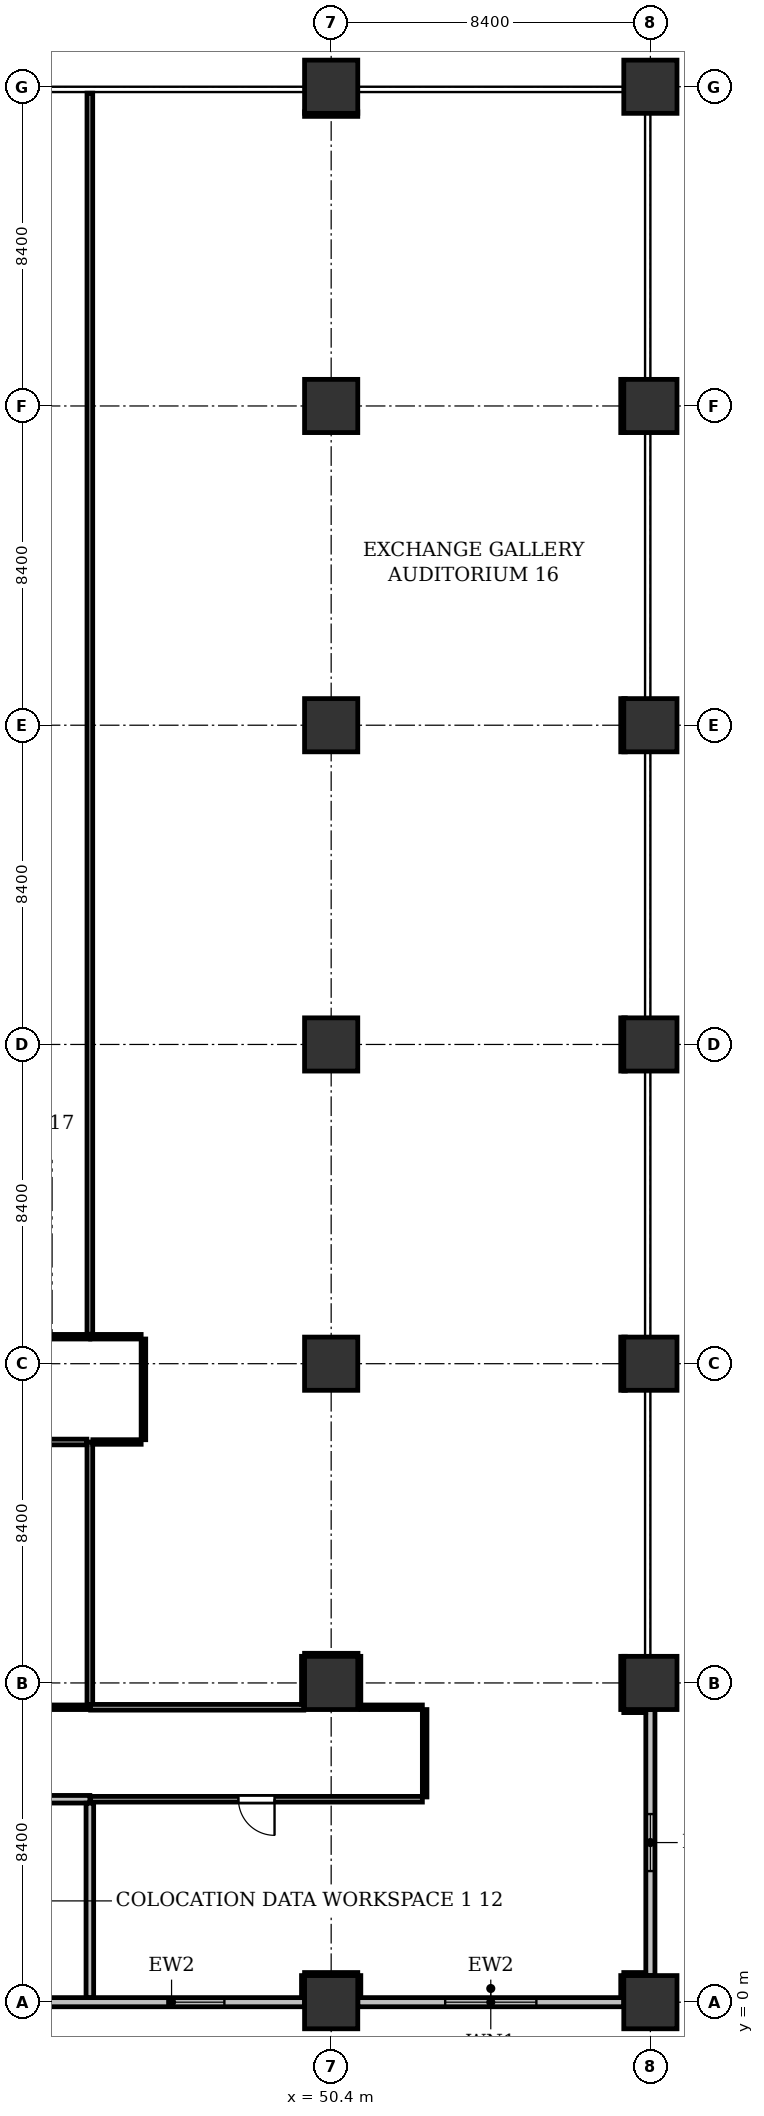
"""IFC4 building model, lengths in metres.
Left out: names, types, materials, properties, quantities, classifications, styles, units other than length and angle.
Written with IfcOpenShell. Run it as: python <this file> out.ifc"""

import sys

from ifc_helpers import new_model, si_unit, direction, frame, frame_2d, origin, origin_2d, place, context, subcontext, project, spatial, rectangle, extrude, element, fill, save


model = new_model("IFC4")
c1 = context("Model", 3, precision=1e-05, world=origin(), true_north=direction((0.0, 1.0)))
c2 = subcontext(c1, "Body", "Model", "MODEL_VIEW")
j1 = project(units=[si_unit("LENGTHUNIT", "METRE"), si_unit("PLANEANGLEUNIT", "RADIAN")], contexts=[c1])
p1 = place(None, origin())
s1 = spatial("IfcSite", under=j1, at=p1, CompositionType="ELEMENT")
p2 = place(p1, origin())
s2 = spatial("IfcBuilding", under=s1, at=p2, CompositionType="ELEMENT")
p3 = place(p2, frame((0.0, 0.0, 10.2)))
s3 = spatial("IfcBuildingStorey", under=s2, at=p3, CompositionType="ELEMENT", Elevation=10.2)
for number, where, z_axis, x_axis in (
    (1, (50.4, 0.0, 0.0), (0.0, 0.0, 1.0), (1.0, 0.0, 0.0)),
    (2, (50.4, 8.4, 0.0), (0.0, 0.0, 1.0), (1.0, 0.0, 0.0)),
    (3, (50.4, 16.8, 0.0), (0.0, 0.0, 1.0), (1.0, 0.0, 0.0)),
    (4, (50.4, 25.2, 0.0), (0.0, 0.0, 1.0), (1.0, 0.0, 0.0)),
    (5, (50.4, 33.6, 0.0), (0.0, 0.0, 1.0), (1.0, 0.0, 0.0)),
    (6, (50.4, 42.0, 0.0), (0.0, 0.0, 1.0), (1.0, 0.0, 0.0)),
    (7, (50.4, 50.4, 0.0), (0.0, 0.0, 1.0), (1.0, 0.0, 0.0)),
    (8, (58.8, 0.0, 0.0), (0.0, 0.0, 1.0), (1.0, 0.0, 0.0)),
    (9, (58.8, 8.4, 0.0), (0.0, 0.0, 1.0), (1.0, 0.0, 0.0)),
    (10, (58.8, 16.8, 0.0), (0.0, 0.0, 1.0), (1.0, 0.0, 0.0)),
    (11, (58.8, 25.2, 0.0), (0.0, 0.0, 1.0), (1.0, 0.0, 0.0)),
    (12, (58.8, 33.6, 0.0), (0.0, 0.0, 1.0), (1.0, 0.0, 0.0)),
    (13, (58.8, 42.0, 0.0), (0.0, 0.0, 1.0), (1.0, 0.0, 0.0)),
    (14, (58.8, 50.4, 0.0), (0.0, 0.0, 1.0), (1.0, 0.0, 0.0)),
):
    element("IfcColumn", number, at=place(p3, frame(where, z_axis=z_axis, x_axis=x_axis)), inside=s3, PredefinedType="COLUMN", context=c2, shape_type="SweptSolid", body=[
        extrude(rectangle(XDim=1.4, YDim=1.4, at=origin_2d()), origin(), (0.0, 0.0, 1.0), 4.8),
    ])
p4 = place(p3, frame((58.8, 7.7, 0.0), z_axis=(0.0, 0.0, 1.0), x_axis=(0.0, -1.0, 0.0)))
e15 = element("IfcWall", 15, at=p4, inside=s3, PredefinedType="STANDARD", context=c2, shape_type="SweptSolid", body=[
    extrude(rectangle(XDim=7.0, YDim=0.24, at=frame_2d((3.5, 0.0))), origin(), (0.0, 0.0, 1.0), 3.913),
])
p5 = place(p4, frame((2.75, 0.0, 0.9)))
e16 = element("IfcOpeningElement", 16, at=p5, cuts=e15, PredefinedType="OPENING", context=c2, shape_type="SweptSolid", body=[
    extrude(rectangle(XDim=1.5, YDim=1.6, at=frame_2d((0.75, 0.8))), frame((0.0, 0.13, 0.0), z_axis=(0.0, -1.0, 0.0), x_axis=(1.0, 0.0, 0.0)), (0.0, 0.0, 1.0), 0.26),
])
p6 = place(p3, frame((58.1, 0.0, 0.0), z_axis=(0.0, 0.0, 1.0), x_axis=(-1.0, 0.0, 0.0)))
e17 = element("IfcWall", 17, at=p6, inside=s3, PredefinedType="STANDARD", context=c2, shape_type="SweptSolid", body=[
    extrude(rectangle(XDim=7.0, YDim=0.24, at=frame_2d((3.5, 0.0))), origin(), (0.0, 0.0, 1.0), 3.725),
])
p7 = place(p6, frame((2.3, 0.0, 0.9)))
e18 = element("IfcOpeningElement", 18, at=p7, cuts=e17, PredefinedType="OPENING", context=c2, shape_type="SweptSolid", body=[
    extrude(rectangle(XDim=2.4, YDim=1.8, at=frame_2d((1.2, 0.9))), frame((0.0, 0.13, 0.0), z_axis=(0.0, -1.0, 0.0), x_axis=(1.0, 0.0, 0.0)), (0.0, 0.0, 1.0), 0.26),
])
p8 = place(p3, frame((49.7, 0.0, 0.0), z_axis=(0.0, 0.0, 1.0), x_axis=(-1.0, 0.0, 0.0)))
e19 = element("IfcWall", 19, at=p8, inside=s3, PredefinedType="STANDARD", context=c2, shape_type="SweptSolid", body=[
    extrude(rectangle(XDim=7.0, YDim=0.24, at=frame_2d((3.5, 0.0))), origin(), (0.0, 0.0, 1.0), 3.725),
])
p9 = place(p8, frame((2.11, 0.0, 0.9)))
e20 = element("IfcOpeningElement", 20, at=p9, cuts=e19, PredefinedType="OPENING", context=c2, shape_type="SweptSolid", body=[
    extrude(rectangle(XDim=1.5, YDim=1.6, at=frame_2d((0.75, 0.8))), frame((0.0, 0.13, 0.0), z_axis=(0.0, -1.0, 0.0), x_axis=(1.0, 0.0, 0.0)), (0.0, 0.0, 1.0), 0.26),
])
p10 = place(p3, frame((42.784, 7.76, 0.0), z_axis=(0.0, 0.0, 1.0), x_axis=(1.0, 0.0, 0.0)))
e21 = element("IfcWall", 21, at=p10, inside=s3, PredefinedType="PARTITIONING", context=c2, shape_type="SweptSolid", body=[
    extrude(rectangle(XDim=1.266, YDim=0.12, at=frame_2d((0.633, 0.0))), origin(), (0.0, 0.0, 1.0), 4.525),
])
p11 = place(p3, frame((44.05, 7.824, 0.0), z_axis=(0.0, 0.0, 1.0), x_axis=(0.0, 1.0, 0.0)))
e22 = element("IfcWall", 22, at=p11, inside=s3, PredefinedType="PARTITIONING", context=c2, shape_type="SweptSolid", body=[
    extrude(rectangle(XDim=6.916, YDim=0.15, at=frame_2d((3.458, 0.0))), origin(), (0.0, 0.0, 1.0), 3.725),
])
p12 = place(p3, frame((43.971, 14.74, 0.0), z_axis=(0.0, 0.0, 1.0), x_axis=(-1.0, 0.0, 0.0)))
e23 = element("IfcWall", 23, at=p12, inside=s3, PredefinedType="PARTITIONING", context=c2, shape_type="SweptSolid", body=[
    extrude(rectangle(XDim=8.311, YDim=0.15, at=frame_2d((4.156, 0.0))), origin(), (0.0, 0.0, 1.0), 3.913),
])
p13 = place(p12, frame((3.68, 0.0, 0.0)))
e24 = element("IfcOpeningElement", 24, at=p13, cuts=e23, PredefinedType="OPENING", context=c2, shape_type="SweptSolid", body=[
    extrude(rectangle(XDim=0.95, YDim=2.15, at=frame_2d((0.475, 1.075))), frame((0.0, 0.085, 0.0), z_axis=(0.0, -1.0, 0.0), x_axis=(1.0, 0.0, 0.0)), (0.0, 0.0, 1.0), 0.17),
])
p14 = place(p3, frame((44.05, 5.34, 0.0), z_axis=(0.0, 0.0, 1.0), x_axis=(-1.0, 0.0, 0.0)))
e25 = element("IfcWall", 25, at=p14, inside=s3, PredefinedType="PARTITIONING", context=c2, shape_type="SweptSolid", body=[
    extrude(rectangle(XDim=14.579, YDim=0.2, at=frame_2d((7.289, 0.0))), origin(), (0.0, 0.0, 1.0), 3.913),
])
p15 = place(p14, frame((6.789, 0.0, 0.0)))
e26 = element("IfcOpeningElement", 26, at=p15, cuts=e25, PredefinedType="OPENING", context=c2, shape_type="SweptSolid", body=[
    extrude(rectangle(XDim=1.0, YDim=2.15, at=frame_2d((0.5, 1.075))), frame((0.0, 0.11, 0.0), z_axis=(0.0, -1.0, 0.0), x_axis=(1.0, 0.0, 0.0)), (0.0, 0.0, 1.0), 0.22),
])
p16 = place(p3, frame((44.05, 0.124, 0.0), z_axis=(0.0, 0.0, 1.0), x_axis=(0.0, 1.0, 0.0)))
e27 = element("IfcWall", 27, at=p16, inside=s3, PredefinedType="PARTITIONING", context=c2, shape_type="SweptSolid", body=[
    extrude(rectangle(XDim=5.112, YDim=0.2, at=frame_2d((2.556, 0.0))), origin(), (0.0, 0.0, 1.0), 3.725),
])
p17 = place(p3, frame((42.717, 17.51, 0.0), z_axis=(0.0, 0.0, 1.0), x_axis=(1.0, 0.0, 0.0)))
e28 = element("IfcWall", 28, at=p17, inside=s3, PredefinedType="PARTITIONING", context=c2, shape_type="SweptSolid", body=[
    extrude(rectangle(XDim=1.333, YDim=0.12, at=frame_2d((0.667, 0.0))), origin(), (0.0, 0.0, 1.0), 4.525),
])
p18 = place(p3, frame((44.05, 17.574, 0.0), z_axis=(0.0, 0.0, 1.0), x_axis=(0.0, 1.0, 0.0)))
e29 = element("IfcWall", 29, at=p18, inside=s3, PredefinedType="PARTITIONING", context=c2, shape_type="SweptSolid", body=[
    extrude(rectangle(XDim=32.657, YDim=0.15, at=frame_2d((16.329, 0.0))), origin(), (0.0, 0.0, 1.0), 3.725),
])
p19 = place(p3, frame((49.68, 0.124, 0.0), z_axis=(0.0, 0.0, 1.0), x_axis=(0.0, 1.0, 0.0)))
e30 = element("IfcWall", 30, at=p19, inside=s3, PredefinedType="PARTITIONING", context=c2, shape_type="SweptSolid", body=[
    extrude(rectangle(XDim=0.576, YDim=0.12, at=frame_2d((0.288, 0.0))), origin(), (0.0, 0.0, 1.0), 4.525),
])
p20 = place(p3, frame((49.7, 0.72, 0.0), z_axis=(0.0, 0.0, 1.0), x_axis=(1.0, 0.0, 0.0)))
e31 = element("IfcWall", 31, at=p20, inside=s3, PredefinedType="PARTITIONING", context=c2, shape_type="SweptSolid", body=[
    extrude(rectangle(XDim=1.4, YDim=0.12, at=frame_2d((0.7, 0.0))), origin(), (0.0, 0.0, 1.0), 3.913),
])
for number, where, z_axis, x_axis in (
    (32, (51.12, 0.7, 0.0), (0.0, 0.0, 1.0), (0.0, -1.0, 0.0)),
    (33, (58.08, 0.124, 0.0), (0.0, 0.0, 1.0), (0.0, 1.0, 0.0)),
    (34, (58.1, 0.72, 0.0), (0.0, 0.0, 1.0), (1.0, 0.0, 0.0)),
    (35, (58.676, 7.68, 0.0), (0.0, 0.0, 1.0), (-1.0, 0.0, 0.0)),
):
    element("IfcWall", number, at=place(p3, frame(where, z_axis=z_axis, x_axis=x_axis)), inside=s3, PredefinedType="PARTITIONING", context=c2, shape_type="SweptSolid", body=[
        extrude(rectangle(XDim=0.576, YDim=0.12, at=frame_2d((0.288, 0.0))), origin(), (0.0, 0.0, 1.0), 4.525),
    ])
p21 = place(p3, frame((58.08, 7.7, 0.0), z_axis=(0.0, 0.0, 1.0), x_axis=(0.0, 1.0, 0.0)))
e36 = element("IfcWall", 36, at=p21, inside=s3, PredefinedType="PARTITIONING", context=c2, shape_type="SweptSolid", body=[
    extrude(rectangle(XDim=1.4, YDim=0.12, at=frame_2d((0.7, 0.0))), origin(), (0.0, 0.0, 1.0), 3.725),
])
for number, where, z_axis, x_axis in (
    (37, (58.08, 16.1, 0.0), (0.0, 0.0, 1.0), (0.0, 1.0, 0.0)),
    (38, (58.08, 24.5, 0.0), (0.0, 0.0, 1.0), (0.0, 1.0, 0.0)),
):
    element("IfcWall", number, at=place(p3, frame(where, z_axis=z_axis, x_axis=x_axis)), inside=s3, PredefinedType="PARTITIONING", context=c2, shape_type="SweptSolid", body=[
        extrude(rectangle(XDim=1.4, YDim=0.12, at=frame_2d((0.7, 0.0))), origin(), (0.0, 0.0, 1.0), 3.725),
    ])
p22 = place(p3, frame((58.08, 32.9, 0.0), z_axis=(0.0, 0.0, 1.0), x_axis=(0.0, 1.0, 0.0)))
e39 = element("IfcWall", 39, at=p22, inside=s3, PredefinedType="PARTITIONING", context=c2, shape_type="SweptSolid", body=[
    extrude(rectangle(XDim=1.4, YDim=0.12, at=frame_2d((0.7, 0.0))), origin(), (0.0, 0.0, 1.0), 3.725),
])
p23 = place(p3, frame((58.08, 41.3, 0.0), z_axis=(0.0, 0.0, 1.0), x_axis=(0.0, 1.0, 0.0)))
e40 = element("IfcWall", 40, at=p23, inside=s3, PredefinedType="PARTITIONING", context=c2, shape_type="SweptSolid", body=[
    extrude(rectangle(XDim=1.4, YDim=0.12, at=frame_2d((0.7, 0.0))), origin(), (0.0, 0.0, 1.0), 3.725),
])
p24 = place(p3, frame((51.1, 49.68, 0.0), z_axis=(0.0, 0.0, 1.0), x_axis=(-1.0, 0.0, 0.0)))
e41 = element("IfcWall", 41, at=p24, inside=s3, PredefinedType="PARTITIONING", context=c2, shape_type="SweptSolid", body=[
    extrude(rectangle(XDim=1.4, YDim=0.12, at=frame_2d((0.7, 0.0))), origin(), (0.0, 0.0, 1.0), 3.913),
])
p25 = place(p3, frame((44.07, 17.51, 0.0), z_axis=(0.0, 0.0, 1.0), x_axis=(1.0, 0.0, 0.0)))
e42 = element("IfcWall", 42, at=p25, inside=s3, PredefinedType="PARTITIONING", context=c2, shape_type="SweptSolid", body=[
    extrude(rectangle(XDim=1.33, YDim=0.12, at=frame_2d((0.665, 0.0))), origin(), (0.0, 0.0, 1.0), 4.525),
])
p26 = place(p3, frame((45.46, 17.45, 0.0), z_axis=(0.0, 0.0, 1.0), x_axis=(0.0, -1.0, 0.0)))
e43 = element("IfcWall", 43, at=p26, inside=s3, PredefinedType="PARTITIONING", context=c2, shape_type="SweptSolid", body=[
    extrude(rectangle(XDim=2.65, YDim=0.12, at=frame_2d((1.325, 0.0))), origin(), (0.0, 0.0, 1.0), 3.725),
])
p27 = place(p3, frame((45.4, 14.74, 0.0), z_axis=(0.0, 0.0, 1.0), x_axis=(-1.0, 0.0, 0.0)))
e44 = element("IfcWall", 44, at=p27, inside=s3, PredefinedType="PARTITIONING", context=c2, shape_type="SweptSolid", body=[
    extrude(rectangle(XDim=1.271, YDim=0.12, at=frame_2d((0.635, 0.0))), origin(), (0.0, 0.0, 1.0), 4.525),
])
p28 = place(p3, frame((44.07, 7.76, 0.0), z_axis=(0.0, 0.0, 1.0), x_axis=(1.0, 0.0, 0.0)))
e45 = element("IfcWall", 45, at=p28, inside=s3, PredefinedType="PARTITIONING", context=c2, shape_type="SweptSolid", body=[
    extrude(rectangle(XDim=5.61, YDim=0.15, at=frame_2d((2.805, 0.0))), origin(), (0.0, 0.0, 1.0), 4.122),
])
p29 = place(p3, frame((49.68, 7.839, 0.0), z_axis=(0.0, 0.0, 1.0), x_axis=(0.0, 1.0, 0.0)))
e46 = element("IfcWall", 46, at=p29, inside=s3, PredefinedType="PARTITIONING", context=c2, shape_type="SweptSolid", body=[
    extrude(rectangle(XDim=1.261, YDim=0.12, at=frame_2d((0.63, 0.0))), origin(), (0.0, 0.0, 1.0), 3.725),
])
p30 = place(p3, frame((49.7, 9.12, 0.0), z_axis=(0.0, 0.0, 1.0), x_axis=(0.999999758706, -0.000694685487, 0.0)))
e47 = element("IfcWall", 47, at=p30, inside=s3, PredefinedType="PARTITIONING", context=c2, shape_type="SweptSolid", body=[
    extrude(rectangle(XDim=1.406, YDim=0.12, at=frame_2d((0.703, 0.0))), origin(), (0.0, 0.0, 1.0), 3.913),
])
p31 = place(p3, frame((51.12, 9.1, 0.0), z_axis=(0.0, 0.0, 1.0), x_axis=(0.0, -1.0, 0.0)))
e48 = element("IfcWall", 48, at=p31, inside=s3, PredefinedType="PARTITIONING", context=c2, shape_type="SweptSolid", body=[
    extrude(rectangle(XDim=1.34, YDim=0.12, at=frame_2d((0.67, 0.0))), origin(), (0.0, 0.0, 1.0), 3.725),
])
p32 = place(p3, frame((51.184, 7.76, 0.0), z_axis=(0.0, 0.0, 1.0), x_axis=(1.0, 0.0, 0.0)))
e49 = element("IfcWall", 49, at=p32, inside=s3, PredefinedType="PARTITIONING", context=c2, shape_type="SweptSolid", body=[
    extrude(rectangle(XDim=1.616, YDim=0.12, at=frame_2d((0.808, 0.0))), origin(), (0.0, 0.0, 1.0), 4.525),
])
p33 = place(p3, frame((52.86, 7.7, 0.0), z_axis=(0.0, 0.0, 1.0), x_axis=(0.0, -1.0, 0.0)))
e50 = element("IfcWall", 50, at=p33, inside=s3, PredefinedType="PARTITIONING", context=c2, shape_type="SweptSolid", body=[
    extrude(rectangle(XDim=2.3, YDim=0.12, at=frame_2d((1.15, 0.0))), origin(), (0.0, 0.0, 1.0), 4.525),
])
p34 = place(p3, frame((52.8, 5.34, 0.0), z_axis=(0.0, 0.0, 1.0), x_axis=(-1.0, 0.0, 0.0)))
e51 = element("IfcWall", 51, at=p34, inside=s3, PredefinedType="PARTITIONING", context=c2, shape_type="SweptSolid", body=[
    extrude(rectangle(XDim=8.73, YDim=0.15, at=frame_2d((4.365, 0.0))), origin(), (0.0, 0.0, 1.0), 3.913),
])
p35 = place(p34, frame((3.89, 0.0, 0.0)))
e52 = element("IfcOpeningElement", 52, at=p35, cuts=e51, PredefinedType="OPENING", context=c2, shape_type="SweptSolid", body=[
    extrude(rectangle(XDim=0.95, YDim=2.15, at=frame_2d((0.475, 1.075))), frame((0.0, 0.085, 0.0), z_axis=(0.0, -1.0, 0.0), x_axis=(1.0, 0.0, 0.0)), (0.0, 0.0, 1.0), 0.17),
])
p36 = place(p5, origin())
e53 = element("IfcWindow", 53, at=p36, inside=s3, PartitioningType="SINGLE_PANEL", PredefinedType="WINDOW", context=c2, shape_type="SweptSolid", body=[
    extrude(rectangle(XDim=1.5, YDim=1.6, at=frame_2d((0.75, 0.8))), frame((0.0, 0.03, 0.0), z_axis=(0.0, -1.0, 0.0), x_axis=(1.0, 0.0, 0.0)), (0.0, 0.0, 1.0), 0.06),
])
fill(e16, e53)
p37 = place(p7, origin())
e54 = element("IfcWindow", 54, at=p37, inside=s3, PartitioningType="SINGLE_PANEL", PredefinedType="WINDOW", context=c2, shape_type="SweptSolid", body=[
    extrude(rectangle(XDim=2.4, YDim=1.8, at=frame_2d((1.2, 0.9))), frame((0.0, 0.03, 0.0), z_axis=(0.0, -1.0, 0.0), x_axis=(1.0, 0.0, 0.0)), (0.0, 0.0, 1.0), 0.06),
])
fill(e18, e54)
p38 = place(p9, origin())
e55 = element("IfcWindow", 55, at=p38, inside=s3, PartitioningType="SINGLE_PANEL", PredefinedType="WINDOW", context=c2, shape_type="SweptSolid", body=[
    extrude(rectangle(XDim=1.5, YDim=1.6, at=frame_2d((0.75, 0.8))), frame((0.0, 0.03, 0.0), z_axis=(0.0, -1.0, 0.0), x_axis=(1.0, 0.0, 0.0)), (0.0, 0.0, 1.0), 0.06),
])
fill(e20, e55)
p39 = place(p35, origin())
e56 = element("IfcDoor", 56, at=p39, inside=s3, OperationType="SINGLE_SWING_LEFT", PredefinedType="DOOR", context=c2, shape_type="SweptSolid", body=[
    extrude(rectangle(XDim=0.95, YDim=2.15, at=frame_2d((0.475, 1.075))), frame((0.0, 0.025, 0.0), z_axis=(0.0, -1.0, 0.0), x_axis=(1.0, 0.0, 0.0)), (0.0, 0.0, 1.0), 0.05),
])
fill(e52, e56)
save(model, sys.argv[1])
